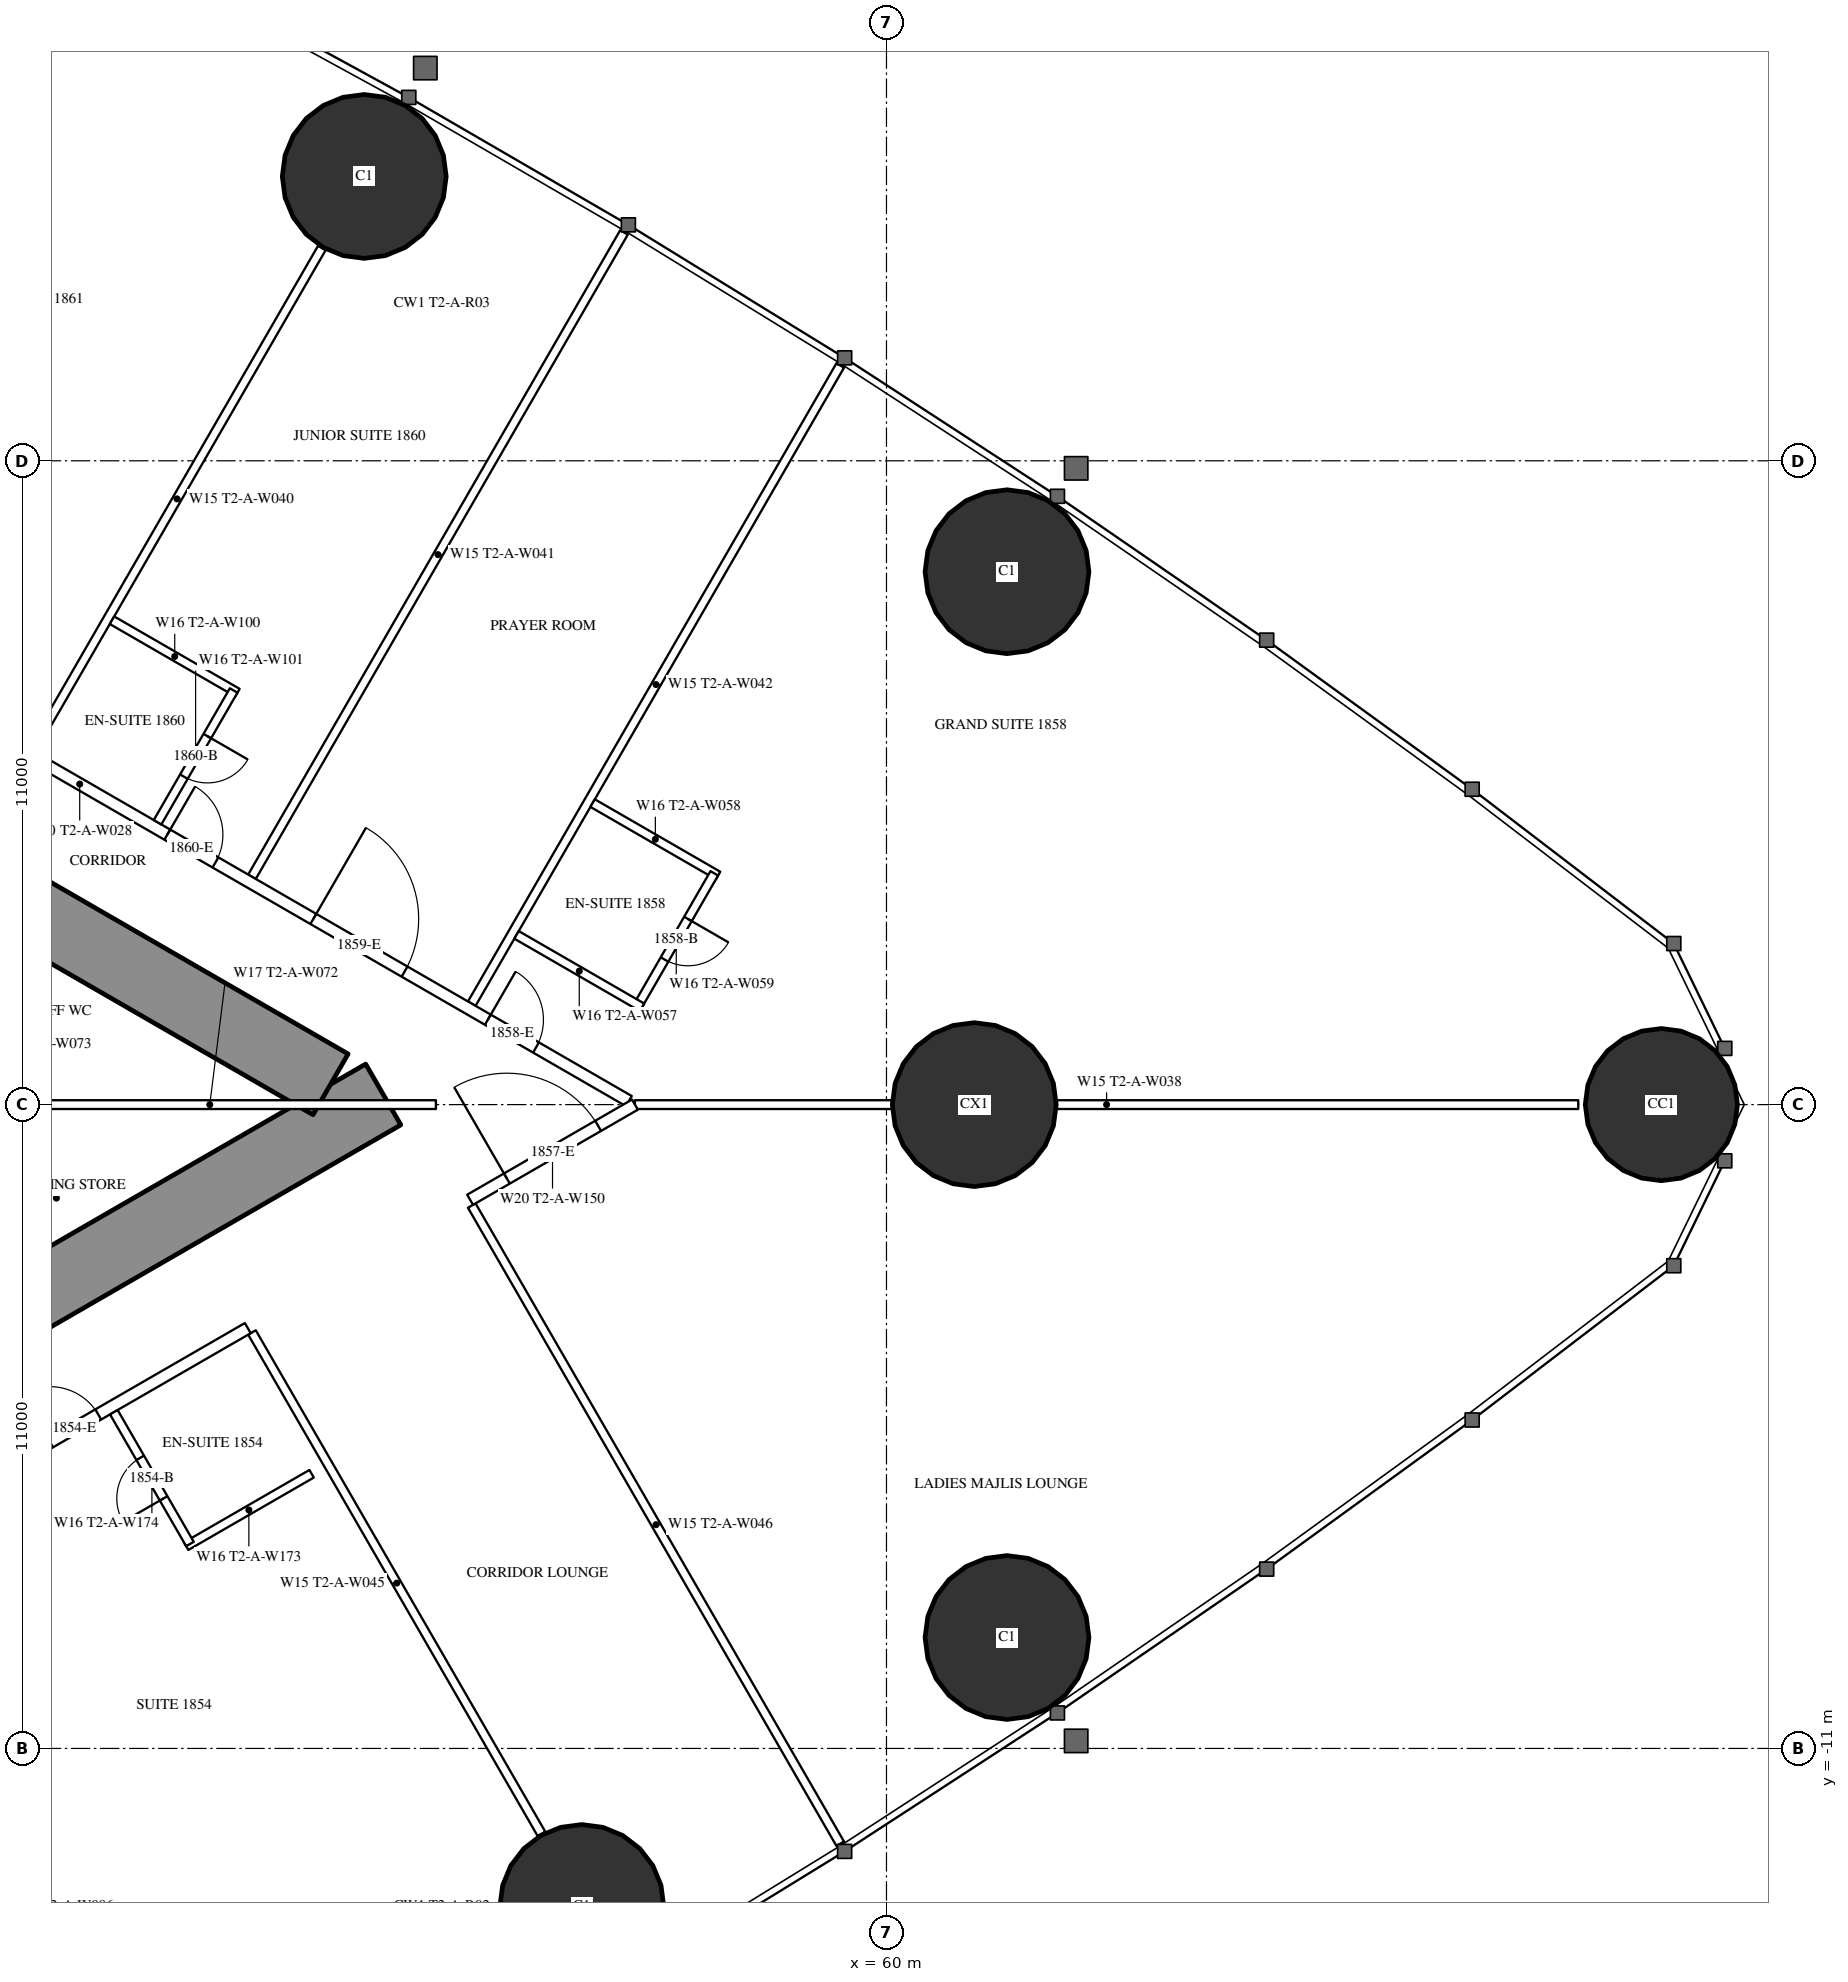
"""IFC4 building model, lengths in metres.
Left out: names, types, materials, properties, quantities, classifications, styles, units other than length and angle.
Written with IfcOpenShell. Run it as: python <this file> out.ifc"""

import sys

from ifc_helpers import new_model, si_unit, direction, frame, frame_2d, origin, origin_2d, place, context, subcontext, project, spatial, rectangle, hollow_circle, extrude, element, fill, save


model = new_model("IFC4")
c1 = context("Model", 3, precision=1e-05, world=origin(), true_north=direction((0.0, 1.0)))
c2 = subcontext(c1, "Body", "Model", "MODEL_VIEW")
j1 = project(units=[si_unit("LENGTHUNIT", "METRE"), si_unit("PLANEANGLEUNIT", "RADIAN")], contexts=[c1])
p1 = place(None, origin())
s1 = spatial("IfcSite", under=j1, at=p1, CompositionType="ELEMENT")
p2 = place(p1, origin())
s2 = spatial("IfcBuilding", under=s1, at=p2, CompositionType="ELEMENT")
p3 = place(p2, frame((0.0, 0.0, 70.5)))
s3 = spatial("IfcBuildingStorey", under=s2, at=p3, CompositionType="ELEMENT", Elevation=70.5)
p4 = place(p3, frame((73.239, 0.0, 0.0), z_axis=(0.0, 0.0, 1.0), x_axis=(1.0, 0.0, 0.0)))
e1 = element("IfcColumn", 1, at=p4, inside=s3, PredefinedType="COLUMN", context=c2, shape_type="SweptSolid", body=[
    extrude(hollow_circle(Radius=1.3, WallThickness=0.1, at=origin_2d()), origin(), (0.0, 0.0, 1.0), 3.5),
])
for number, where, z_axis, x_axis in (
    (2, (62.059, 9.105, 0.0), (0.0, 0.0, 1.0), (1.0, 0.0, 0.0)),
    (3, (51.078, 15.858, 0.0), (0.0, 0.0, 1.0), (1.0, 0.0, 0.0)),
    (4, (54.795, -13.701, 0.0), (0.0, 0.0, 1.0), (1.0, 0.0, 0.0)),
    (5, (62.059, -9.105, 0.0), (0.0, 0.0, 1.0), (1.0, 0.0, 0.0)),
):
    element("IfcColumn", number, at=place(p3, frame(where, z_axis=z_axis, x_axis=x_axis)), inside=s3, PredefinedType="COLUMN", context=c2, shape_type="SweptSolid", body=[
        extrude(hollow_circle(Radius=1.4, WallThickness=0.12, at=origin_2d()), origin(), (0.0, 0.0, 1.0), 3.5),
    ])
p5 = place(p3, frame((61.5, 0.0, 0.0), z_axis=(0.0, 0.0, 1.0), x_axis=(1.0, 0.0, 0.0)))
e6 = element("IfcColumn", 6, at=p5, inside=s3, PredefinedType="COLUMN", context=c2, shape_type="SweptSolid", body=[
    extrude(hollow_circle(Radius=1.4, WallThickness=0.1, at=origin_2d()), origin(), (0.0, 0.0, 1.0), 3.5),
])
p6 = place(p3, frame((27.2, -13.8, 0.0), z_axis=(0.0, 0.0, 1.0), x_axis=(0.866027159892, 0.499996958321, 0.0)))
e7 = element("IfcWall", 7, at=p6, inside=s3, PredefinedType="SHEAR", context=c2, shape_type="SweptSolid", body=[
    extrude(rectangle(XDim=27.947, YDim=1.2, at=frame_2d((13.973, 0.0))), origin(), (0.0, 0.0, 1.0), 3.5),
])
p7 = place(p6, frame((4.6, 0.0, 0.0)))
e8 = element("IfcOpeningElement", 8, at=p7, cuts=e7, PredefinedType="OPENING", context=c2, shape_type="SweptSolid", body=[
    extrude(rectangle(XDim=1.0, YDim=2.2, at=frame_2d((0.5, 1.1))), frame((0.0, 0.61, 0.0), z_axis=(0.0, -1.0, 0.0), x_axis=(1.0, 0.0, 0.0)), (0.0, 0.0, 1.0), 1.22),
])
p8 = place(p6, frame((13.395, 0.0, 0.0)))
e9 = element("IfcOpeningElement", 9, at=p8, cuts=e7, PredefinedType="OPENING", context=c2, shape_type="SweptSolid", body=[
    extrude(rectangle(XDim=1.8, YDim=2.2, at=frame_2d((0.9, 1.1))), frame((0.0, 0.61, 0.0), z_axis=(0.0, -1.0, 0.0), x_axis=(1.0, 0.0, 0.0)), (0.0, 0.0, 1.0), 1.22),
])
p9 = place(p3, frame((27.2, 13.8, 0.0), z_axis=(0.0, 0.0, 1.0), x_axis=(0.866024515034, -0.500001539357, 0.0)))
e10 = element("IfcWall", 10, at=p9, inside=s3, PredefinedType="SHEAR", context=c2, shape_type="SweptSolid", body=[
    extrude(rectangle(XDim=26.907, YDim=1.2, at=frame_2d((13.454, 0.0))), origin(), (0.0, 0.0, 1.0), 3.5),
])
p10 = place(p9, frame((4.6, 0.0, 0.0)))
e11 = element("IfcOpeningElement", 11, at=p10, cuts=e10, PredefinedType="OPENING", context=c2, shape_type="SweptSolid", body=[
    extrude(rectangle(XDim=1.0, YDim=2.2, at=frame_2d((0.5, 1.1))), frame((0.0, 0.61, 0.0), z_axis=(0.0, -1.0, 0.0), x_axis=(1.0, 0.0, 0.0)), (0.0, 0.0, 1.0), 1.22),
])
p11 = place(p9, frame((13.395, 0.0, 0.0)))
e12 = element("IfcOpeningElement", 12, at=p11, cuts=e10, PredefinedType="OPENING", context=c2, shape_type="SweptSolid", body=[
    extrude(rectangle(XDim=1.8, YDim=2.2, at=frame_2d((0.9, 1.1))), frame((0.0, 0.61, 0.0), z_axis=(0.0, -1.0, 0.0), x_axis=(1.0, 0.0, 0.0)), (0.0, 0.0, 1.0), 1.22),
])
p12 = place(p3, frame((41.647, -8.23, 0.0), z_axis=(0.0, 0.0, 1.0), x_axis=(0.49998590462, -0.866033541603, 0.0)))
e13 = element("IfcWall", 13, at=p12, inside=s3, PredefinedType="PARTITIONING", context=c2, shape_type="SweptSolid", body=[
    extrude(rectangle(XDim=12.621, YDim=0.15, at=frame_2d((6.311, 0.0))), origin(), (0.0, 0.0, 1.0), 3.25),
])
p13 = place(p3, frame((49.159, -3.893, 0.0), z_axis=(0.0, 0.0, 1.0), x_axis=(0.499998773722, -0.866026111775, 0.0)))
e14 = element("IfcWall", 14, at=p13, inside=s3, PredefinedType="PARTITIONING", context=c2, shape_type="SweptSolid", body=[
    extrude(rectangle(XDim=9.892, YDim=0.15, at=frame_2d((4.946, 0.0))), origin(), (0.0, 0.0, 1.0), 2.25),
])
p14 = place(p3, frame((52.915, -1.725, 0.0), z_axis=(0.0, 0.0, 1.0), x_axis=(0.499997163113, -0.866027041656, 0.0)))
e15 = element("IfcWall", 15, at=p14, inside=s3, PredefinedType="PARTITIONING", context=c2, shape_type="SweptSolid", body=[
    extrude(rectangle(XDim=12.591, YDim=0.15, at=frame_2d((6.295, 0.0))), origin(), (0.0, 0.0, 1.0), 3.25),
])
p15 = place(p3, frame((45.403, 6.062, 0.0), z_axis=(0.0, 0.0, 1.0), x_axis=(0.500013434677, 0.866017647131, 0.0)))
e16 = element("IfcWall", 16, at=p15, inside=s3, PredefinedType="PARTITIONING", context=c2, shape_type="SweptSolid", body=[
    extrude(rectangle(XDim=9.902, YDim=0.15, at=frame_2d((4.951, 0.0))), origin(), (0.0, 0.0, 1.0), 2.25),
])
p16 = place(p3, frame((49.159, 3.893, 0.0), z_axis=(0.0, 0.0, 1.0), x_axis=(0.499995664361, 0.866027906952, 0.0)))
e17 = element("IfcWall", 17, at=p16, inside=s3, PredefinedType="PARTITIONING", context=c2, shape_type="SweptSolid", body=[
    extrude(rectangle(XDim=12.711, YDim=0.15, at=frame_2d((6.356, 0.0))), origin(), (0.0, 0.0, 1.0), 3.25),
])
p17 = place(p3, frame((52.915, 1.725, 0.0), z_axis=(0.0, 0.0, 1.0), x_axis=(0.499997163113, 0.866027041656, 0.0)))
e18 = element("IfcWall", 18, at=p17, inside=s3, PredefinedType="PARTITIONING", context=c2, shape_type="SweptSolid", body=[
    extrude(rectangle(XDim=12.591, YDim=0.15, at=frame_2d((6.295, 0.0))), origin(), (0.0, 0.0, 1.0), 3.25),
])
p18 = place(p3, frame((55.702, 0.0, 0.0), z_axis=(0.0, 0.0, 1.0), x_axis=(1.0, 0.0, 0.0)))
e19 = element("IfcWall", 19, at=p18, inside=s3, PredefinedType="PARTITIONING", context=c2, shape_type="SweptSolid", body=[
    extrude(rectangle(XDim=16.117, YDim=0.15, at=frame_2d((8.059, 0.0))), origin(), (0.0, 0.0, 1.0), 2.25),
])
p19 = place(p3, frame((36.834, 10.894, 0.0), z_axis=(0.0, 0.0, 1.0), x_axis=(0.866028157229, -0.499995230863, 0.0)))
e20 = element("IfcWall", 20, at=p19, inside=s3, PredefinedType="PARTITIONING", context=c2, shape_type="SweptSolid", body=[
    extrude(rectangle(XDim=21.667, YDim=0.2, at=frame_2d((10.833, 0.0))), origin(), (0.0, 0.0, 1.0), 3.25),
])
p20 = place(p19, frame((18.885, 0.0, 0.0)))
e21 = element("IfcOpeningElement", 21, at=p20, cuts=e20, PredefinedType="OPENING", context=c2, shape_type="SweptSolid", body=[
    extrude(rectangle(XDim=0.95, YDim=2.2, at=frame_2d((0.475, 1.1))), frame((0.0, 0.11, 0.0), z_axis=(0.0, -1.0, 0.0), x_axis=(1.0, 0.0, 0.0)), (0.0, 0.0, 1.0), 0.22),
])
p21 = place(p19, frame((15.443, 0.0, 0.0)))
e22 = element("IfcOpeningElement", 22, at=p21, cuts=e20, PredefinedType="OPENING", context=c2, shape_type="SweptSolid", body=[
    extrude(rectangle(XDim=1.8, YDim=2.2, at=frame_2d((0.9, 1.1))), frame((0.0, 0.11, 0.0), z_axis=(0.0, -1.0, 0.0), x_axis=(1.0, 0.0, 0.0)), (0.0, 0.0, 1.0), 0.22),
])
p22 = place(p19, frame((12.562, 0.0, 0.0)))
e23 = element("IfcOpeningElement", 23, at=p22, cuts=e20, PredefinedType="OPENING", context=c2, shape_type="SweptSolid", body=[
    extrude(rectangle(XDim=0.95, YDim=2.2, at=frame_2d((0.475, 1.1))), frame((0.0, 0.11, 0.0), z_axis=(0.0, -1.0, 0.0), x_axis=(1.0, 0.0, 0.0)), (0.0, 0.0, 1.0), 0.22),
])
p23 = place(p19, frame((4.292, 0.0, 0.0)))
e24 = element("IfcOpeningElement", 24, at=p23, cuts=e20, PredefinedType="OPENING", context=c2, shape_type="SweptSolid", body=[
    extrude(rectangle(XDim=1.0, YDim=2.2, at=frame_2d((0.5, 1.1))), frame((0.0, 0.11, 0.0), z_axis=(0.0, -1.0, 0.0), x_axis=(1.0, 0.0, 0.0)), (0.0, 0.0, 1.0), 0.22),
])
p24 = place(p3, frame((37.96, -10.243, 0.0), z_axis=(0.0, 0.0, 1.0), x_axis=(0.866030548046, 0.499991089772, 0.0)))
e25 = element("IfcWall", 25, at=p24, inside=s3, PredefinedType="PARTITIONING", context=c2, shape_type="SweptSolid", body=[
    extrude(rectangle(XDim=12.849, YDim=0.2, at=frame_2d((6.425, 0.0))), origin(), (0.0, 0.0, 1.0), 3.25),
])
p25 = place(p24, frame((8.949, 0.0, 0.0)))
e26 = element("IfcOpeningElement", 26, at=p25, cuts=e25, PredefinedType="OPENING", context=c2, shape_type="SweptSolid", body=[
    extrude(rectangle(XDim=0.95, YDim=2.2, at=frame_2d((0.475, 1.1))), frame((0.0, 0.11, 0.0), z_axis=(0.0, -1.0, 0.0), x_axis=(1.0, 0.0, 0.0)), (0.0, 0.0, 1.0), 0.22),
])
p26 = place(p24, frame((0.6, 0.0, 0.0)))
e27 = element("IfcOpeningElement", 27, at=p26, cuts=e25, PredefinedType="OPENING", context=c2, shape_type="SweptSolid", body=[
    extrude(rectangle(XDim=0.95, YDim=2.2, at=frame_2d((0.475, 1.1))), frame((0.0, 0.11, 0.0), z_axis=(0.0, -1.0, 0.0), x_axis=(1.0, 0.0, 0.0)), (0.0, 0.0, 1.0), 0.22),
])
p27 = place(p3, frame((52.886, -1.626, 0.0), z_axis=(0.0, 0.0, 1.0), x_axis=(0.866030540913, 0.499991102127, 0.0)))
e28 = element("IfcWall", 28, at=p27, inside=s3, PredefinedType="PARTITIONING", context=c2, shape_type="SweptSolid", body=[
    extrude(rectangle(XDim=3.251, YDim=0.2, at=frame_2d((1.626, 0.0))), origin(), (0.0, 0.0, 1.0), 3.25),
])
p28 = place(p27, frame((0.726, 0.0, 0.0)))
e29 = element("IfcOpeningElement", 29, at=p28, cuts=e28, PredefinedType="OPENING", context=c2, shape_type="SweptSolid", body=[
    extrude(rectangle(XDim=1.8, YDim=2.2, at=frame_2d((0.9, 1.1))), frame((0.0, 0.11, 0.0), z_axis=(0.0, -1.0, 0.0), x_axis=(1.0, 0.0, 0.0)), (0.0, 0.0, 1.0), 0.22),
])
p29 = place(p3, frame((48.035, -7.545, 0.0), z_axis=(0.0, 0.0, 1.0), x_axis=(0.866006523861, 0.500032699561, 0.0)))
e30 = element("IfcWall", 30, at=p29, inside=s3, PredefinedType="PARTITIONING", context=c2, shape_type="SweptSolid", body=[
    extrude(rectangle(XDim=2.475, YDim=0.15, at=frame_2d((1.237, 0.0))), origin(), (0.0, 0.0, 1.0), 3.25),
])
p30 = place(p3, frame((46.8, -5.255, 0.0), z_axis=(0.0, 0.0, 1.0), x_axis=(0.500006934395, -0.866021400173, 0.0)))
e31 = element("IfcWall", 31, at=p30, inside=s3, PredefinedType="PARTITIONING", context=c2, shape_type="SweptSolid", body=[
    extrude(rectangle(XDim=2.6, YDim=0.15, at=frame_2d((1.3, 0.0))), origin(), (0.0, 0.0, 1.0), 3.25),
])
p31 = place(p30, frame((0.9, 0.0, 0.0)))
e32 = element("IfcOpeningElement", 32, at=p31, cuts=e31, PredefinedType="OPENING", context=c2, shape_type="SweptSolid", body=[
    extrude(rectangle(XDim=0.8, YDim=2.2, at=frame_2d((0.4, 1.1))), frame((0.0, 0.085, 0.0), z_axis=(0.0, -1.0, 0.0), x_axis=(1.0, 0.0, 0.0)), (0.0, 0.0, 1.0), 0.17),
])
p32 = place(p3, frame((54.98, 5.151, 0.0), z_axis=(0.0, 0.0, 1.0), x_axis=(0.86604923931, -0.499958713387, 0.0)))
e33 = element("IfcWall", 33, at=p32, inside=s3, PredefinedType="PARTITIONING", context=c2, shape_type="SweptSolid", body=[
    extrude(rectangle(XDim=2.475, YDim=0.15, at=frame_2d((1.237, 0.0))), origin(), (0.0, 0.0, 1.0), 3.25),
])
p33 = place(p3, frame((55.758, 1.7, 0.0), z_axis=(0.0, 0.0, 1.0), x_axis=(0.500006934395, 0.866021400173, 0.0)))
e34 = element("IfcWall", 34, at=p33, inside=s3, PredefinedType="PARTITIONING", context=c2, shape_type="SweptSolid", body=[
    extrude(rectangle(XDim=2.6, YDim=0.15, at=frame_2d((1.3, 0.0))), origin(), (0.0, 0.0, 1.0), 3.25),
])
p34 = place(p33, frame((0.9, 0.0, 0.0)))
e35 = element("IfcOpeningElement", 35, at=p34, cuts=e34, PredefinedType="OPENING", context=c2, shape_type="SweptSolid", body=[
    extrude(rectangle(XDim=0.8, YDim=2.2, at=frame_2d((0.4, 1.1))), frame((0.0, 0.085, 0.0), z_axis=(0.0, -1.0, 0.0), x_axis=(1.0, 0.0, 0.0)), (0.0, 0.0, 1.0), 0.17),
])
p35 = place(p3, frame((53.68, 2.9, 0.0), z_axis=(0.0, 0.0, 1.0), x_axis=(0.866006523861, -0.500032699561, 0.0)))
e36 = element("IfcWall", 36, at=p35, inside=s3, PredefinedType="PARTITIONING", context=c2, shape_type="SweptSolid", body=[
    extrude(rectangle(XDim=2.475, YDim=0.15, at=frame_2d((1.237, 0.0))), origin(), (0.0, 0.0, 1.0), 3.25),
])
p36 = place(p3, frame((46.768, 8.276, 0.0), z_axis=(0.0, 0.0, 1.0), x_axis=(0.866031185235, -0.4999899861, 0.0)))
e37 = element("IfcWall", 37, at=p36, inside=s3, PredefinedType="PARTITIONING", context=c2, shape_type="SweptSolid", body=[
    extrude(rectangle(XDim=2.475, YDim=0.15, at=frame_2d((1.238, 0.0))), origin(), (0.0, 0.0, 1.0), 3.25),
])
p37 = place(p3, frame((47.546, 4.824, 0.0), z_axis=(0.0, 0.0, 1.0), x_axis=(0.500006934395, 0.866021400173, 0.0)))
e38 = element("IfcWall", 38, at=p37, inside=s3, PredefinedType="PARTITIONING", context=c2, shape_type="SweptSolid", body=[
    extrude(rectangle(XDim=2.6, YDim=0.15, at=frame_2d((1.3, 0.0))), origin(), (0.0, 0.0, 1.0), 3.25),
])
p38 = place(p37, frame((0.9, 0.0, 0.0)))
e39 = element("IfcOpeningElement", 39, at=p38, cuts=e38, PredefinedType="OPENING", context=c2, shape_type="SweptSolid", body=[
    extrude(rectangle(XDim=0.8, YDim=2.2, at=frame_2d((0.4, 1.1))), frame((0.0, 0.085, 0.0), z_axis=(0.0, -1.0, 0.0), x_axis=(1.0, 0.0, 0.0)), (0.0, 0.0, 1.0), 0.17),
])
p39 = place(p3, frame((44.575, 0.0, 0.0), z_axis=(0.0, 0.0, 1.0), x_axis=(1.0, 0.0, 0.0)))
e40 = element("IfcWall", 40, at=p39, inside=s3, PredefinedType="PARTITIONING", context=c2, shape_type="SweptSolid", body=[
    extrude(rectangle(XDim=7.727, YDim=0.15, at=frame_2d((3.864, 0.0))), origin(), (0.0, 0.0, 1.0), 2.25),
])
p40 = place(p31, origin())
e41 = element("IfcDoor", 41, at=p40, inside=s3, OperationType="SINGLE_SWING_RIGHT", PredefinedType="DOOR", context=c2, shape_type="SweptSolid", body=[
    extrude(rectangle(XDim=0.8, YDim=2.2, at=frame_2d((0.4, 1.1))), frame((0.0, 0.025, 0.0), z_axis=(0.0, -1.0, 0.0), x_axis=(1.0, 0.0, 0.0)), (0.0, 0.0, 1.0), 0.05),
])
fill(e32, e41)
p41 = place(p25, origin())
e42 = element("IfcDoor", 42, at=p41, inside=s3, OperationType="SINGLE_SWING_LEFT", PredefinedType="DOOR", context=c2, shape_type="SweptSolid", body=[
    extrude(rectangle(XDim=0.95, YDim=2.2, at=frame_2d((0.475, 1.1))), frame((0.0, 0.025, 0.0), z_axis=(0.0, -1.0, 0.0), x_axis=(1.0, 0.0, 0.0)), (0.0, 0.0, 1.0), 0.05),
])
fill(e26, e42)
p42 = place(p28, origin())
e43 = element("IfcDoor", 43, at=p42, inside=s3, OperationType="DOUBLE_DOOR_SINGLE_SWING", PredefinedType="DOOR", context=c2, shape_type="SweptSolid", body=[
    extrude(rectangle(XDim=1.8, YDim=2.2, at=frame_2d((0.9, 1.1))), frame((0.0, 0.025, 0.0), z_axis=(0.0, -1.0, 0.0), x_axis=(1.0, 0.0, 0.0)), (0.0, 0.0, 1.0), 0.05),
])
fill(e29, e43)
p43 = place(p34, origin())
e44 = element("IfcDoor", 44, at=p43, inside=s3, OperationType="SINGLE_SWING_RIGHT", PredefinedType="DOOR", context=c2, shape_type="SweptSolid", body=[
    extrude(rectangle(XDim=0.8, YDim=2.2, at=frame_2d((0.4, 1.1))), frame((0.0, 0.025, 0.0), z_axis=(0.0, -1.0, 0.0), x_axis=(1.0, 0.0, 0.0)), (0.0, 0.0, 1.0), 0.05),
])
fill(e35, e44)
p44 = place(p20, origin())
e45 = element("IfcDoor", 45, at=p44, inside=s3, OperationType="SINGLE_SWING_LEFT", PredefinedType="DOOR", context=c2, shape_type="SweptSolid", body=[
    extrude(rectangle(XDim=0.95, YDim=2.2, at=frame_2d((0.475, 1.1))), frame((0.0, 0.025, 0.0), z_axis=(0.0, -1.0, 0.0), x_axis=(1.0, 0.0, 0.0)), (0.0, 0.0, 1.0), 0.05),
])
fill(e21, e45)
p45 = place(p21, origin())
e46 = element("IfcDoor", 46, at=p45, inside=s3, OperationType="DOUBLE_DOOR_SINGLE_SWING", PredefinedType="DOOR", context=c2, shape_type="SweptSolid", body=[
    extrude(rectangle(XDim=1.8, YDim=2.2, at=frame_2d((0.9, 1.1))), frame((0.0, 0.025, 0.0), z_axis=(0.0, -1.0, 0.0), x_axis=(1.0, 0.0, 0.0)), (0.0, 0.0, 1.0), 0.05),
])
fill(e22, e46)
p46 = place(p38, origin())
e47 = element("IfcDoor", 47, at=p46, inside=s3, OperationType="SINGLE_SWING_RIGHT", PredefinedType="DOOR", context=c2, shape_type="SweptSolid", body=[
    extrude(rectangle(XDim=0.8, YDim=2.2, at=frame_2d((0.4, 1.1))), frame((0.0, 0.025, 0.0), z_axis=(0.0, -1.0, 0.0), x_axis=(1.0, 0.0, 0.0)), (0.0, 0.0, 1.0), 0.05),
])
fill(e39, e47)
p47 = place(p22, origin())
e48 = element("IfcDoor", 48, at=p47, inside=s3, OperationType="SINGLE_SWING_LEFT", PredefinedType="DOOR", context=c2, shape_type="SweptSolid", body=[
    extrude(rectangle(XDim=0.95, YDim=2.2, at=frame_2d((0.475, 1.1))), frame((0.0, 0.025, 0.0), z_axis=(0.0, -1.0, 0.0), x_axis=(1.0, 0.0, 0.0)), (0.0, 0.0, 1.0), 0.05),
])
fill(e23, e48)
save(model, sys.argv[1])
